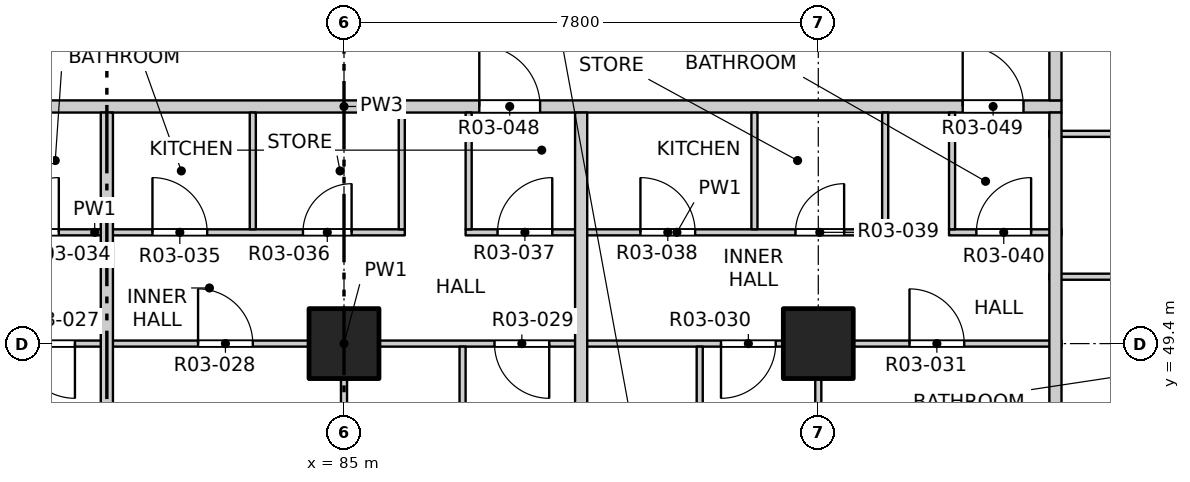
"""IFC4 building model, lengths in metres.
Left out: names, types, materials, properties, quantities, classifications, styles, units other than length and angle.
Written with IfcOpenShell. Run it as: python <this file> out.ifc"""

import sys

from ifc_helpers import new_model, si_unit, direction, frame, frame_2d, origin, origin_2d, place, context, subcontext, project, spatial, rectangle, extrude, element, fill, save


model = new_model("IFC4")
c1 = context("Model", 3, precision=1e-05, world=origin(), true_north=direction((0.0, 1.0)))
c2 = subcontext(c1, "Body", "Model", "MODEL_VIEW")
j1 = project(units=[si_unit("LENGTHUNIT", "METRE"), si_unit("PLANEANGLEUNIT", "RADIAN")], contexts=[c1])
p1 = place(None, origin())
s1 = spatial("IfcSite", under=j1, at=p1, CompositionType="ELEMENT")
p2 = place(p1, origin())
s2 = spatial("IfcBuilding", under=s1, at=p2, CompositionType="ELEMENT")
p3 = place(p2, frame((0.0, 0.0, 43.3)))
s3 = spatial("IfcBuildingStorey", under=s2, at=p3, CompositionType="ELEMENT", Elevation=43.3)
for number, where, z_axis, x_axis in (
    (1, (85.0, 49.4, -0.25), (0.0, 0.0, 1.0), (1.0, 0.0, 0.0)),
    (2, (92.8, 49.4, -0.25), (0.0, 0.0, 1.0), (1.0, 0.0, 0.0)),
):
    element("IfcColumn", number, at=place(p3, frame(where, z_axis=z_axis, x_axis=x_axis)), inside=s3, PredefinedType="COLUMN", context=c2, shape_type="SweptSolid", body=[
        extrude(rectangle(XDim=1.15, YDim=1.15, at=origin_2d()), origin(), (0.0, 0.0, 1.0), 3.35),
    ])
p4 = place(p3, frame((73.2, 49.4, 0.0), z_axis=(0.0, 0.0, 1.0), x_axis=(1.0, 0.0, 0.0)))
e3 = element("IfcWall", 3, at=p4, inside=s3, PredefinedType="PARTITIONING", context=c2, shape_type="SweptSolid", body=[
    extrude(rectangle(XDim=23.6, YDim=0.1, at=frame_2d((11.8, 0.0))), origin(), (0.0, 0.0, 1.0), 3.1),
])
p5 = place(p4, frame((1.6, 0.0, 0.0)))
e4 = element("IfcOpeningElement", 4, at=p5, cuts=e3, PredefinedType="OPENING", context=c2, shape_type="SweptSolid", body=[
    extrude(rectangle(XDim=0.9, YDim=2.1, at=frame_2d((0.45, 1.05))), frame((0.0, 0.06, 0.0), z_axis=(0.0, -1.0, 0.0), x_axis=(1.0, 0.0, 0.0)), (0.0, 0.0, 1.0), 0.12),
])
p6 = place(p4, frame((6.475, 0.0, 0.0)))
e5 = element("IfcOpeningElement", 5, at=p6, cuts=e3, PredefinedType="OPENING", context=c2, shape_type="SweptSolid", body=[
    extrude(rectangle(XDim=0.9, YDim=2.1, at=frame_2d((0.45, 1.05))), frame((0.0, 0.06, 0.0), z_axis=(0.0, -1.0, 0.0), x_axis=(1.0, 0.0, 0.0)), (0.0, 0.0, 1.0), 0.12),
])
p7 = place(p4, frame((9.4, 0.0, 0.0)))
e6 = element("IfcOpeningElement", 6, at=p7, cuts=e3, PredefinedType="OPENING", context=c2, shape_type="SweptSolid", body=[
    extrude(rectangle(XDim=0.9, YDim=2.1, at=frame_2d((0.45, 1.05))), frame((0.0, 0.06, 0.0), z_axis=(0.0, -1.0, 0.0), x_axis=(1.0, 0.0, 0.0)), (0.0, 0.0, 1.0), 0.12),
])
p8 = place(p4, frame((14.275, 0.0, 0.0)))
e7 = element("IfcOpeningElement", 7, at=p8, cuts=e3, PredefinedType="OPENING", context=c2, shape_type="SweptSolid", body=[
    extrude(rectangle(XDim=0.9, YDim=2.1, at=frame_2d((0.45, 1.05))), frame((0.0, 0.06, 0.0), z_axis=(0.0, -1.0, 0.0), x_axis=(1.0, 0.0, 0.0)), (0.0, 0.0, 1.0), 0.12),
])
p9 = place(p4, frame((18.0, 0.0, 0.0)))
e8 = element("IfcOpeningElement", 8, at=p9, cuts=e3, PredefinedType="OPENING", context=c2, shape_type="SweptSolid", body=[
    extrude(rectangle(XDim=0.9, YDim=2.1, at=frame_2d((0.45, 1.05))), frame((0.0, 0.06, 0.0), z_axis=(0.0, -1.0, 0.0), x_axis=(1.0, 0.0, 0.0)), (0.0, 0.0, 1.0), 0.12),
])
p10 = place(p4, frame((21.1, 0.0, 0.0)))
e9 = element("IfcOpeningElement", 9, at=p10, cuts=e3, PredefinedType="OPENING", context=c2, shape_type="SweptSolid", body=[
    extrude(rectangle(XDim=0.9, YDim=2.1, at=frame_2d((0.45, 1.05))), frame((0.0, 0.06, 0.0), z_axis=(0.0, -1.0, 0.0), x_axis=(1.0, 0.0, 0.0)), (0.0, 0.0, 1.0), 0.12),
])
p11 = place(p3, frame((96.6, 50.5, 0.0), z_axis=(0.0, 0.0, 1.0), x_axis=(1.0, 0.0, 0.0)))
e10 = element("IfcWall", 10, at=p11, inside=s3, PredefinedType="PARTITIONING", context=c2, shape_type="SweptSolid", body=[
    extrude(rectangle(XDim=2.22, YDim=0.1, at=frame_2d((1.11, 0.0))), origin(), (0.0, 0.0, 1.0), 3.1),
])
p12 = place(p3, frame((75.8, 51.23, 0.0), z_axis=(0.0, 0.0, 1.0), x_axis=(1.0, 0.0, 0.0)))
e11 = element("IfcWall", 11, at=p12, inside=s3, PredefinedType="PARTITIONING", context=c2, shape_type="SweptSolid", body=[
    extrude(rectangle(XDim=10.2, YDim=0.1, at=frame_2d((5.1, 0.0))), origin(), (0.0, 0.0, 1.0), 3.1),
])
p13 = place(p12, frame((0.985, 0.0, 0.0)))
e12 = element("IfcOpeningElement", 12, at=p13, cuts=e11, PredefinedType="OPENING", context=c2, shape_type="SweptSolid", body=[
    extrude(rectangle(XDim=0.9, YDim=2.1, at=frame_2d((0.45, 1.05))), frame((0.0, 0.06, 0.0), z_axis=(0.0, -1.0, 0.0), x_axis=(1.0, 0.0, 0.0)), (0.0, 0.0, 1.0), 0.12),
])
p14 = place(p12, frame((3.61, 0.0, 0.0)))
e13 = element("IfcOpeningElement", 13, at=p14, cuts=e11, PredefinedType="OPENING", context=c2, shape_type="SweptSolid", body=[
    extrude(rectangle(XDim=0.9, YDim=2.1, at=frame_2d((0.45, 1.05))), frame((0.0, 0.06, 0.0), z_axis=(0.0, -1.0, 0.0), x_axis=(1.0, 0.0, 0.0)), (0.0, 0.0, 1.0), 0.12),
])
p15 = place(p12, frame((6.05, 0.0, 0.0)))
e14 = element("IfcOpeningElement", 14, at=p15, cuts=e11, PredefinedType="OPENING", context=c2, shape_type="SweptSolid", body=[
    extrude(rectangle(XDim=0.9, YDim=2.1, at=frame_2d((0.45, 1.05))), frame((0.0, 0.06, 0.0), z_axis=(0.0, -1.0, 0.0), x_axis=(1.0, 0.0, 0.0)), (0.0, 0.0, 1.0), 0.12),
])
p16 = place(p12, frame((8.525, 0.0, 0.0)))
e15 = element("IfcOpeningElement", 15, at=p16, cuts=e11, PredefinedType="OPENING", context=c2, shape_type="SweptSolid", body=[
    extrude(rectangle(XDim=0.8, YDim=2.1, at=frame_2d((0.4, 1.05))), frame((0.0, 0.06, 0.0), z_axis=(0.0, -1.0, 0.0), x_axis=(1.0, 0.0, 0.0)), (0.0, 0.0, 1.0), 0.12),
])
p17 = place(p3, frame((87.0, 51.23, 0.0), z_axis=(0.0, 0.0, 1.0), x_axis=(1.0, 0.0, 0.0)))
e16 = element("IfcWall", 16, at=p17, inside=s3, PredefinedType="PARTITIONING", context=c2, shape_type="SweptSolid", body=[
    extrude(rectangle(XDim=6.95, YDim=0.1, at=frame_2d((3.475, 0.0))), origin(), (0.0, 0.0, 1.0), 3.1),
])
p18 = place(p17, frame((0.525, 0.0, 0.0)))
e17 = element("IfcOpeningElement", 17, at=p18, cuts=e16, PredefinedType="OPENING", context=c2, shape_type="SweptSolid", body=[
    extrude(rectangle(XDim=0.9, YDim=2.1, at=frame_2d((0.45, 1.05))), frame((0.0, 0.06, 0.0), z_axis=(0.0, -1.0, 0.0), x_axis=(1.0, 0.0, 0.0)), (0.0, 0.0, 1.0), 0.12),
])
p19 = place(p17, frame((2.875, 0.0, 0.0)))
e18 = element("IfcOpeningElement", 18, at=p19, cuts=e16, PredefinedType="OPENING", context=c2, shape_type="SweptSolid", body=[
    extrude(rectangle(XDim=0.9, YDim=2.1, at=frame_2d((0.45, 1.05))), frame((0.0, 0.06, 0.0), z_axis=(0.0, -1.0, 0.0), x_axis=(1.0, 0.0, 0.0)), (0.0, 0.0, 1.0), 0.12),
])
p20 = place(p17, frame((5.425, 0.0, 0.0)))
e19 = element("IfcOpeningElement", 19, at=p20, cuts=e16, PredefinedType="OPENING", context=c2, shape_type="SweptSolid", body=[
    extrude(rectangle(XDim=0.8, YDim=2.1, at=frame_2d((0.4, 1.05))), frame((0.0, 0.06, 0.0), z_axis=(0.0, -1.0, 0.0), x_axis=(1.0, 0.0, 0.0)), (0.0, 0.0, 1.0), 0.12),
])
p21 = place(p3, frame((94.95, 51.23, 0.0), z_axis=(0.0, 0.0, 1.0), x_axis=(1.0, 0.0, 0.0)))
e20 = element("IfcWall", 20, at=p21, inside=s3, PredefinedType="PARTITIONING", context=c2, shape_type="SweptSolid", body=[
    extrude(rectangle(XDim=1.85, YDim=0.1, at=frame_2d((0.925, 0.0))), origin(), (0.0, 0.0, 1.0), 3.1),
])
p22 = place(p21, frame((0.45, 0.0, 0.0)))
e21 = element("IfcOpeningElement", 21, at=p22, cuts=e20, PredefinedType="OPENING", context=c2, shape_type="SweptSolid", body=[
    extrude(rectangle(XDim=0.9, YDim=2.1, at=frame_2d((0.45, 1.05))), frame((0.0, 0.06, 0.0), z_axis=(0.0, -1.0, 0.0), x_axis=(1.0, 0.0, 0.0)), (0.0, 0.0, 1.0), 0.12),
])
p23 = place(p3, frame((96.6, 52.85, 0.0), z_axis=(0.0, 0.0, 1.0), x_axis=(1.0, 0.0, 0.0)))
e22 = element("IfcWall", 22, at=p23, inside=s3, PredefinedType="PARTITIONING", context=c2, shape_type="SweptSolid", body=[
    extrude(rectangle(XDim=2.22, YDim=0.1, at=frame_2d((1.11, 0.0))), origin(), (0.0, 0.0, 1.0), 3.1),
])
p24 = place(p3, frame((73.2, 53.3, 0.0), z_axis=(0.0, 0.0, 1.0), x_axis=(1.0, 0.0, 0.0)))
e23 = element("IfcWall", 23, at=p24, inside=s3, PredefinedType="PARTITIONING", context=c2, shape_type="SweptSolid", body=[
    extrude(rectangle(XDim=23.6, YDim=0.2, at=frame_2d((11.8, 0.0))), origin(), (0.0, 0.0, 1.0), 3.1),
])
p25 = place(p24, frame((2.825, 0.0, 0.0)))
e24 = element("IfcOpeningElement", 24, at=p25, cuts=e23, PredefinedType="OPENING", context=c2, shape_type="SweptSolid", body=[
    extrude(rectangle(XDim=1.0, YDim=2.1, at=frame_2d((0.5, 1.05))), frame((0.0, 0.11, 0.0), z_axis=(0.0, -1.0, 0.0), x_axis=(1.0, 0.0, 0.0)), (0.0, 0.0, 1.0), 0.22),
])
p26 = place(p24, frame((14.025, 0.0, 0.0)))
e25 = element("IfcOpeningElement", 25, at=p26, cuts=e23, PredefinedType="OPENING", context=c2, shape_type="SweptSolid", body=[
    extrude(rectangle(XDim=1.0, YDim=2.1, at=frame_2d((0.5, 1.05))), frame((0.0, 0.11, 0.0), z_axis=(0.0, -1.0, 0.0), x_axis=(1.0, 0.0, 0.0)), (0.0, 0.0, 1.0), 0.22),
])
p27 = place(p24, frame((21.975, 0.0, 0.0)))
e26 = element("IfcOpeningElement", 26, at=p27, cuts=e23, PredefinedType="OPENING", context=c2, shape_type="SweptSolid", body=[
    extrude(rectangle(XDim=1.0, YDim=2.1, at=frame_2d((0.5, 1.05))), frame((0.0, 0.11, 0.0), z_axis=(0.0, -1.0, 0.0), x_axis=(1.0, 0.0, 0.0)), (0.0, 0.0, 1.0), 0.22),
])
p28 = place(p3, frame((81.1, 41.9, 0.0), z_axis=(0.0, 0.0, 1.0), x_axis=(0.0, 1.0, 0.0)))
e27 = element("IfcWall", 27, at=p28, inside=s3, PredefinedType="PARTITIONING", context=c2, shape_type="SweptSolid", body=[
    extrude(rectangle(XDim=11.3, YDim=0.2, at=frame_2d((5.65, 0.0))), origin(), (0.0, 0.0, 1.0), 3.1),
])
p29 = place(p3, frame((83.5, 51.28, 0.0), z_axis=(0.0, 0.0, 1.0), x_axis=(0.0, 1.0, 0.0)))
e28 = element("IfcWall", 28, at=p29, inside=s3, PredefinedType="PARTITIONING", context=c2, shape_type="SweptSolid", body=[
    extrude(rectangle(XDim=1.92, YDim=0.1, at=frame_2d((0.96, 0.0))), origin(), (0.0, 0.0, 1.0), 3.1),
])
p30 = place(p3, frame((85.0, 41.9, 0.0), z_axis=(0.0, 0.0, 1.0), x_axis=(0.0, 1.0, 0.0)))
e29 = element("IfcWall", 29, at=p30, inside=s3, PredefinedType="PARTITIONING", context=c2, shape_type="SweptSolid", body=[
    extrude(rectangle(XDim=7.45, YDim=0.1, at=frame_2d((3.725, 0.0))), origin(), (0.0, 0.0, 1.0), 3.1),
])
p31 = place(p3, frame((85.95, 51.28, 0.0), z_axis=(0.0, 0.0, 1.0), x_axis=(0.0, 1.0, 0.0)))
e30 = element("IfcWall", 30, at=p31, inside=s3, PredefinedType="PARTITIONING", context=c2, shape_type="SweptSolid", body=[
    extrude(rectangle(XDim=1.92, YDim=0.1, at=frame_2d((0.96, 0.0))), origin(), (0.0, 0.0, 1.0), 3.1),
])
p32 = place(p3, frame((86.95, 46.0, 0.0), z_axis=(0.0, 0.0, 1.0), x_axis=(0.0, 1.0, 0.0)))
e31 = element("IfcWall", 31, at=p32, inside=s3, PredefinedType="PARTITIONING", context=c2, shape_type="SweptSolid", body=[
    extrude(rectangle(XDim=3.35, YDim=0.1, at=frame_2d((1.675, 0.0))), origin(), (0.0, 0.0, 1.0), 3.1),
])
p33 = place(p3, frame((87.05, 51.28, 0.0), z_axis=(0.0, 0.0, 1.0), x_axis=(0.0, 1.0, 0.0)))
e32 = element("IfcWall", 32, at=p33, inside=s3, PredefinedType="PARTITIONING", context=c2, shape_type="SweptSolid", body=[
    extrude(rectangle(XDim=1.92, YDim=0.1, at=frame_2d((0.96, 0.0))), origin(), (0.0, 0.0, 1.0), 3.1),
])
p34 = place(p3, frame((88.9, 41.9, 0.0), z_axis=(0.0, 0.0, 1.0), x_axis=(0.0, 1.0, 0.0)))
e33 = element("IfcWall", 33, at=p34, inside=s3, PredefinedType="PARTITIONING", context=c2, shape_type="SweptSolid", body=[
    extrude(rectangle(XDim=11.3, YDim=0.2, at=frame_2d((5.65, 0.0))), origin(), (0.0, 0.0, 1.0), 3.1),
])
p35 = place(p3, frame((90.85, 46.15, 0.0), z_axis=(0.0, 0.0, 1.0), x_axis=(0.0, 1.0, 0.0)))
e34 = element("IfcWall", 34, at=p35, inside=s3, PredefinedType="PARTITIONING", context=c2, shape_type="SweptSolid", body=[
    extrude(rectangle(XDim=3.2, YDim=0.1, at=frame_2d((1.6, 0.0))), origin(), (0.0, 0.0, 1.0), 3.1),
])
p36 = place(p3, frame((91.75, 51.28, 0.0), z_axis=(0.0, 0.0, 1.0), x_axis=(0.0, 1.0, 0.0)))
e35 = element("IfcWall", 35, at=p36, inside=s3, PredefinedType="PARTITIONING", context=c2, shape_type="SweptSolid", body=[
    extrude(rectangle(XDim=1.92, YDim=0.1, at=frame_2d((0.96, 0.0))), origin(), (0.0, 0.0, 1.0), 3.1),
])
p37 = place(p3, frame((92.8, 41.9, 0.0), z_axis=(0.0, 0.0, 1.0), x_axis=(0.0, 1.0, 0.0)))
e36 = element("IfcWall", 36, at=p37, inside=s3, PredefinedType="PARTITIONING", context=c2, shape_type="SweptSolid", body=[
    extrude(rectangle(XDim=7.45, YDim=0.1, at=frame_2d((3.725, 0.0))), origin(), (0.0, 0.0, 1.0), 3.1),
])
for number, where, z_axis, x_axis in (
    (37, (93.9, 51.28, 0.0), (0.0, 0.0, 1.0), (0.0, 1.0, 0.0)),
    (38, (95.0, 51.28, 0.0), (0.0, 0.0, 1.0), (0.0, 1.0, 0.0)),
):
    element("IfcWall", number, at=place(p3, frame(where, z_axis=z_axis, x_axis=x_axis)), inside=s3, PredefinedType="PARTITIONING", context=c2, shape_type="SweptSolid", body=[
        extrude(rectangle(XDim=1.92, YDim=0.1, at=frame_2d((0.96, 0.0))), origin(), (0.0, 0.0, 1.0), 3.1),
    ])
p38 = place(p3, frame((96.7, 41.9, 0.0), z_axis=(0.0, 0.0, 1.0), x_axis=(0.0, 1.0, 0.0)))
e39 = element("IfcWall", 39, at=p38, inside=s3, PredefinedType="PARTITIONING", context=c2, shape_type="SweptSolid", body=[
    extrude(rectangle(XDim=11.3, YDim=0.2, at=frame_2d((5.65, 0.0))), origin(), (0.0, 0.0, 1.0), 3.1),
])
p39 = place(p3, frame((96.7, 53.4, 0.0), z_axis=(0.0, 0.0, 1.0), x_axis=(0.0, 1.0, 0.0)))
e40 = element("IfcWall", 40, at=p39, inside=s3, PredefinedType="PARTITIONING", context=c2, shape_type="SweptSolid", body=[
    extrude(rectangle(XDim=31.0, YDim=0.2, at=frame_2d((15.5, 0.0))), origin(), (0.0, 0.0, 1.0), 3.1),
])
p40 = place(p39, frame((3.325, 0.0, 0.0)))
e41 = element("IfcOpeningElement", 41, at=p40, cuts=e40, PredefinedType="OPENING", context=c2, shape_type="SweptSolid", body=[
    extrude(rectangle(XDim=1.0, YDim=2.1, at=frame_2d((0.5, 1.05))), frame((0.0, 0.11, 0.0), z_axis=(0.0, -1.0, 0.0), x_axis=(1.0, 0.0, 0.0)), (0.0, 0.0, 1.0), 0.22),
])
p41 = place(p39, frame((11.125, 0.0, 0.0)))
e42 = element("IfcOpeningElement", 42, at=p41, cuts=e40, PredefinedType="OPENING", context=c2, shape_type="SweptSolid", body=[
    extrude(rectangle(XDim=1.0, YDim=2.1, at=frame_2d((0.5, 1.05))), frame((0.0, 0.11, 0.0), z_axis=(0.0, -1.0, 0.0), x_axis=(1.0, 0.0, 0.0)), (0.0, 0.0, 1.0), 0.22),
])
p42 = place(p39, frame((26.875, 0.0, 0.0)))
e43 = element("IfcOpeningElement", 43, at=p42, cuts=e40, PredefinedType="OPENING", context=c2, shape_type="SweptSolid", body=[
    extrude(rectangle(XDim=1.0, YDim=2.1, at=frame_2d((0.5, 1.05))), frame((0.0, 0.11, 0.0), z_axis=(0.0, -1.0, 0.0), x_axis=(1.0, 0.0, 0.0)), (0.0, 0.0, 1.0), 0.22),
])
p43 = place(p6, origin())
e44 = element("IfcDoor", 44, at=p43, inside=s3, OperationType="SINGLE_SWING_LEFT", PredefinedType="DOOR", context=c2, shape_type="SweptSolid", body=[
    extrude(rectangle(XDim=0.9, YDim=2.1, at=frame_2d((0.45, 1.05))), frame((0.0, 0.025, 0.0), z_axis=(0.0, -1.0, 0.0), x_axis=(1.0, 0.0, 0.0)), (0.0, 0.0, 1.0), 0.05),
])
fill(e5, e44)
p44 = place(p7, origin())
e45 = element("IfcDoor", 45, at=p44, inside=s3, OperationType="SINGLE_SWING_LEFT", PredefinedType="DOOR", context=c2, shape_type="SweptSolid", body=[
    extrude(rectangle(XDim=0.9, YDim=2.1, at=frame_2d((0.45, 1.05))), frame((0.0, 0.025, 0.0), z_axis=(0.0, -1.0, 0.0), x_axis=(1.0, 0.0, 0.0)), (0.0, 0.0, 1.0), 0.05),
])
fill(e6, e45)
p45 = place(p8, origin())
e46 = element("IfcDoor", 46, at=p45, inside=s3, OperationType="SINGLE_SWING_LEFT", PredefinedType="DOOR", context=c2, shape_type="SweptSolid", body=[
    extrude(rectangle(XDim=0.9, YDim=2.1, at=frame_2d((0.45, 1.05))), frame((0.0, 0.025, 0.0), z_axis=(0.0, -1.0, 0.0), x_axis=(1.0, 0.0, 0.0)), (0.0, 0.0, 1.0), 0.05),
])
fill(e7, e46)
p46 = place(p9, origin())
e47 = element("IfcDoor", 47, at=p46, inside=s3, OperationType="SINGLE_SWING_RIGHT", PredefinedType="DOOR", context=c2, shape_type="SweptSolid", body=[
    extrude(rectangle(XDim=0.9, YDim=2.1, at=frame_2d((0.45, 1.05))), frame((0.0, 0.025, 0.0), z_axis=(0.0, -1.0, 0.0), x_axis=(1.0, 0.0, 0.0)), (0.0, 0.0, 1.0), 0.05),
])
fill(e8, e47)
p47 = place(p10, origin())
e48 = element("IfcDoor", 48, at=p47, inside=s3, OperationType="SINGLE_SWING_LEFT", PredefinedType="DOOR", context=c2, shape_type="SweptSolid", body=[
    extrude(rectangle(XDim=0.9, YDim=2.1, at=frame_2d((0.45, 1.05))), frame((0.0, 0.025, 0.0), z_axis=(0.0, -1.0, 0.0), x_axis=(1.0, 0.0, 0.0)), (0.0, 0.0, 1.0), 0.05),
])
fill(e9, e48)
p48 = place(p14, origin())
e49 = element("IfcDoor", 49, at=p48, inside=s3, OperationType="SINGLE_SWING_RIGHT", PredefinedType="DOOR", context=c2, shape_type="SweptSolid", body=[
    extrude(rectangle(XDim=0.9, YDim=2.1, at=frame_2d((0.45, 1.05))), frame((0.0, 0.025, 0.0), z_axis=(0.0, -1.0, 0.0), x_axis=(1.0, 0.0, 0.0)), (0.0, 0.0, 1.0), 0.05),
])
fill(e13, e49)
p49 = place(p15, origin())
e50 = element("IfcDoor", 50, at=p49, inside=s3, OperationType="SINGLE_SWING_LEFT", PredefinedType="DOOR", context=c2, shape_type="SweptSolid", body=[
    extrude(rectangle(XDim=0.9, YDim=2.1, at=frame_2d((0.45, 1.05))), frame((0.0, 0.025, 0.0), z_axis=(0.0, -1.0, 0.0), x_axis=(1.0, 0.0, 0.0)), (0.0, 0.0, 1.0), 0.05),
])
fill(e14, e50)
p50 = place(p16, origin())
e51 = element("IfcDoor", 51, at=p50, inside=s3, OperationType="SINGLE_SWING_RIGHT", PredefinedType="DOOR", context=c2, shape_type="SweptSolid", body=[
    extrude(rectangle(XDim=0.8, YDim=2.1, at=frame_2d((0.4, 1.05))), frame((0.0, 0.025, 0.0), z_axis=(0.0, -1.0, 0.0), x_axis=(1.0, 0.0, 0.0)), (0.0, 0.0, 1.0), 0.05),
])
fill(e15, e51)
p51 = place(p18, origin())
e52 = element("IfcDoor", 52, at=p51, inside=s3, OperationType="SINGLE_SWING_RIGHT", PredefinedType="DOOR", context=c2, shape_type="SweptSolid", body=[
    extrude(rectangle(XDim=0.9, YDim=2.1, at=frame_2d((0.45, 1.05))), frame((0.0, 0.025, 0.0), z_axis=(0.0, -1.0, 0.0), x_axis=(1.0, 0.0, 0.0)), (0.0, 0.0, 1.0), 0.05),
])
fill(e17, e52)
p52 = place(p19, origin())
e53 = element("IfcDoor", 53, at=p52, inside=s3, OperationType="SINGLE_SWING_LEFT", PredefinedType="DOOR", context=c2, shape_type="SweptSolid", body=[
    extrude(rectangle(XDim=0.9, YDim=2.1, at=frame_2d((0.45, 1.05))), frame((0.0, 0.025, 0.0), z_axis=(0.0, -1.0, 0.0), x_axis=(1.0, 0.0, 0.0)), (0.0, 0.0, 1.0), 0.05),
])
fill(e18, e53)
p53 = place(p20, origin())
e54 = element("IfcDoor", 54, at=p53, inside=s3, OperationType="SINGLE_SWING_RIGHT", PredefinedType="DOOR", context=c2, shape_type="SweptSolid", body=[
    extrude(rectangle(XDim=0.8, YDim=2.1, at=frame_2d((0.4, 1.05))), frame((0.0, 0.025, 0.0), z_axis=(0.0, -1.0, 0.0), x_axis=(1.0, 0.0, 0.0)), (0.0, 0.0, 1.0), 0.05),
])
fill(e19, e54)
p54 = place(p22, origin())
e55 = element("IfcDoor", 55, at=p54, inside=s3, OperationType="SINGLE_SWING_RIGHT", PredefinedType="DOOR", context=c2, shape_type="SweptSolid", body=[
    extrude(rectangle(XDim=0.9, YDim=2.1, at=frame_2d((0.45, 1.05))), frame((0.0, 0.025, 0.0), z_axis=(0.0, -1.0, 0.0), x_axis=(1.0, 0.0, 0.0)), (0.0, 0.0, 1.0), 0.05),
])
fill(e21, e55)
p55 = place(p26, origin())
e56 = element("IfcDoor", 56, at=p55, inside=s3, OperationType="SINGLE_SWING_LEFT", PredefinedType="DOOR", context=c2, shape_type="SweptSolid", body=[
    extrude(rectangle(XDim=1.0, YDim=2.1, at=frame_2d((0.5, 1.05))), frame((0.0, 0.025, 0.0), z_axis=(0.0, -1.0, 0.0), x_axis=(1.0, 0.0, 0.0)), (0.0, 0.0, 1.0), 0.05),
])
fill(e25, e56)
p56 = place(p27, origin())
e57 = element("IfcDoor", 57, at=p56, inside=s3, OperationType="SINGLE_SWING_LEFT", PredefinedType="DOOR", context=c2, shape_type="SweptSolid", body=[
    extrude(rectangle(XDim=1.0, YDim=2.1, at=frame_2d((0.5, 1.05))), frame((0.0, 0.025, 0.0), z_axis=(0.0, -1.0, 0.0), x_axis=(1.0, 0.0, 0.0)), (0.0, 0.0, 1.0), 0.05),
])
fill(e26, e57)
save(model, sys.argv[1])
